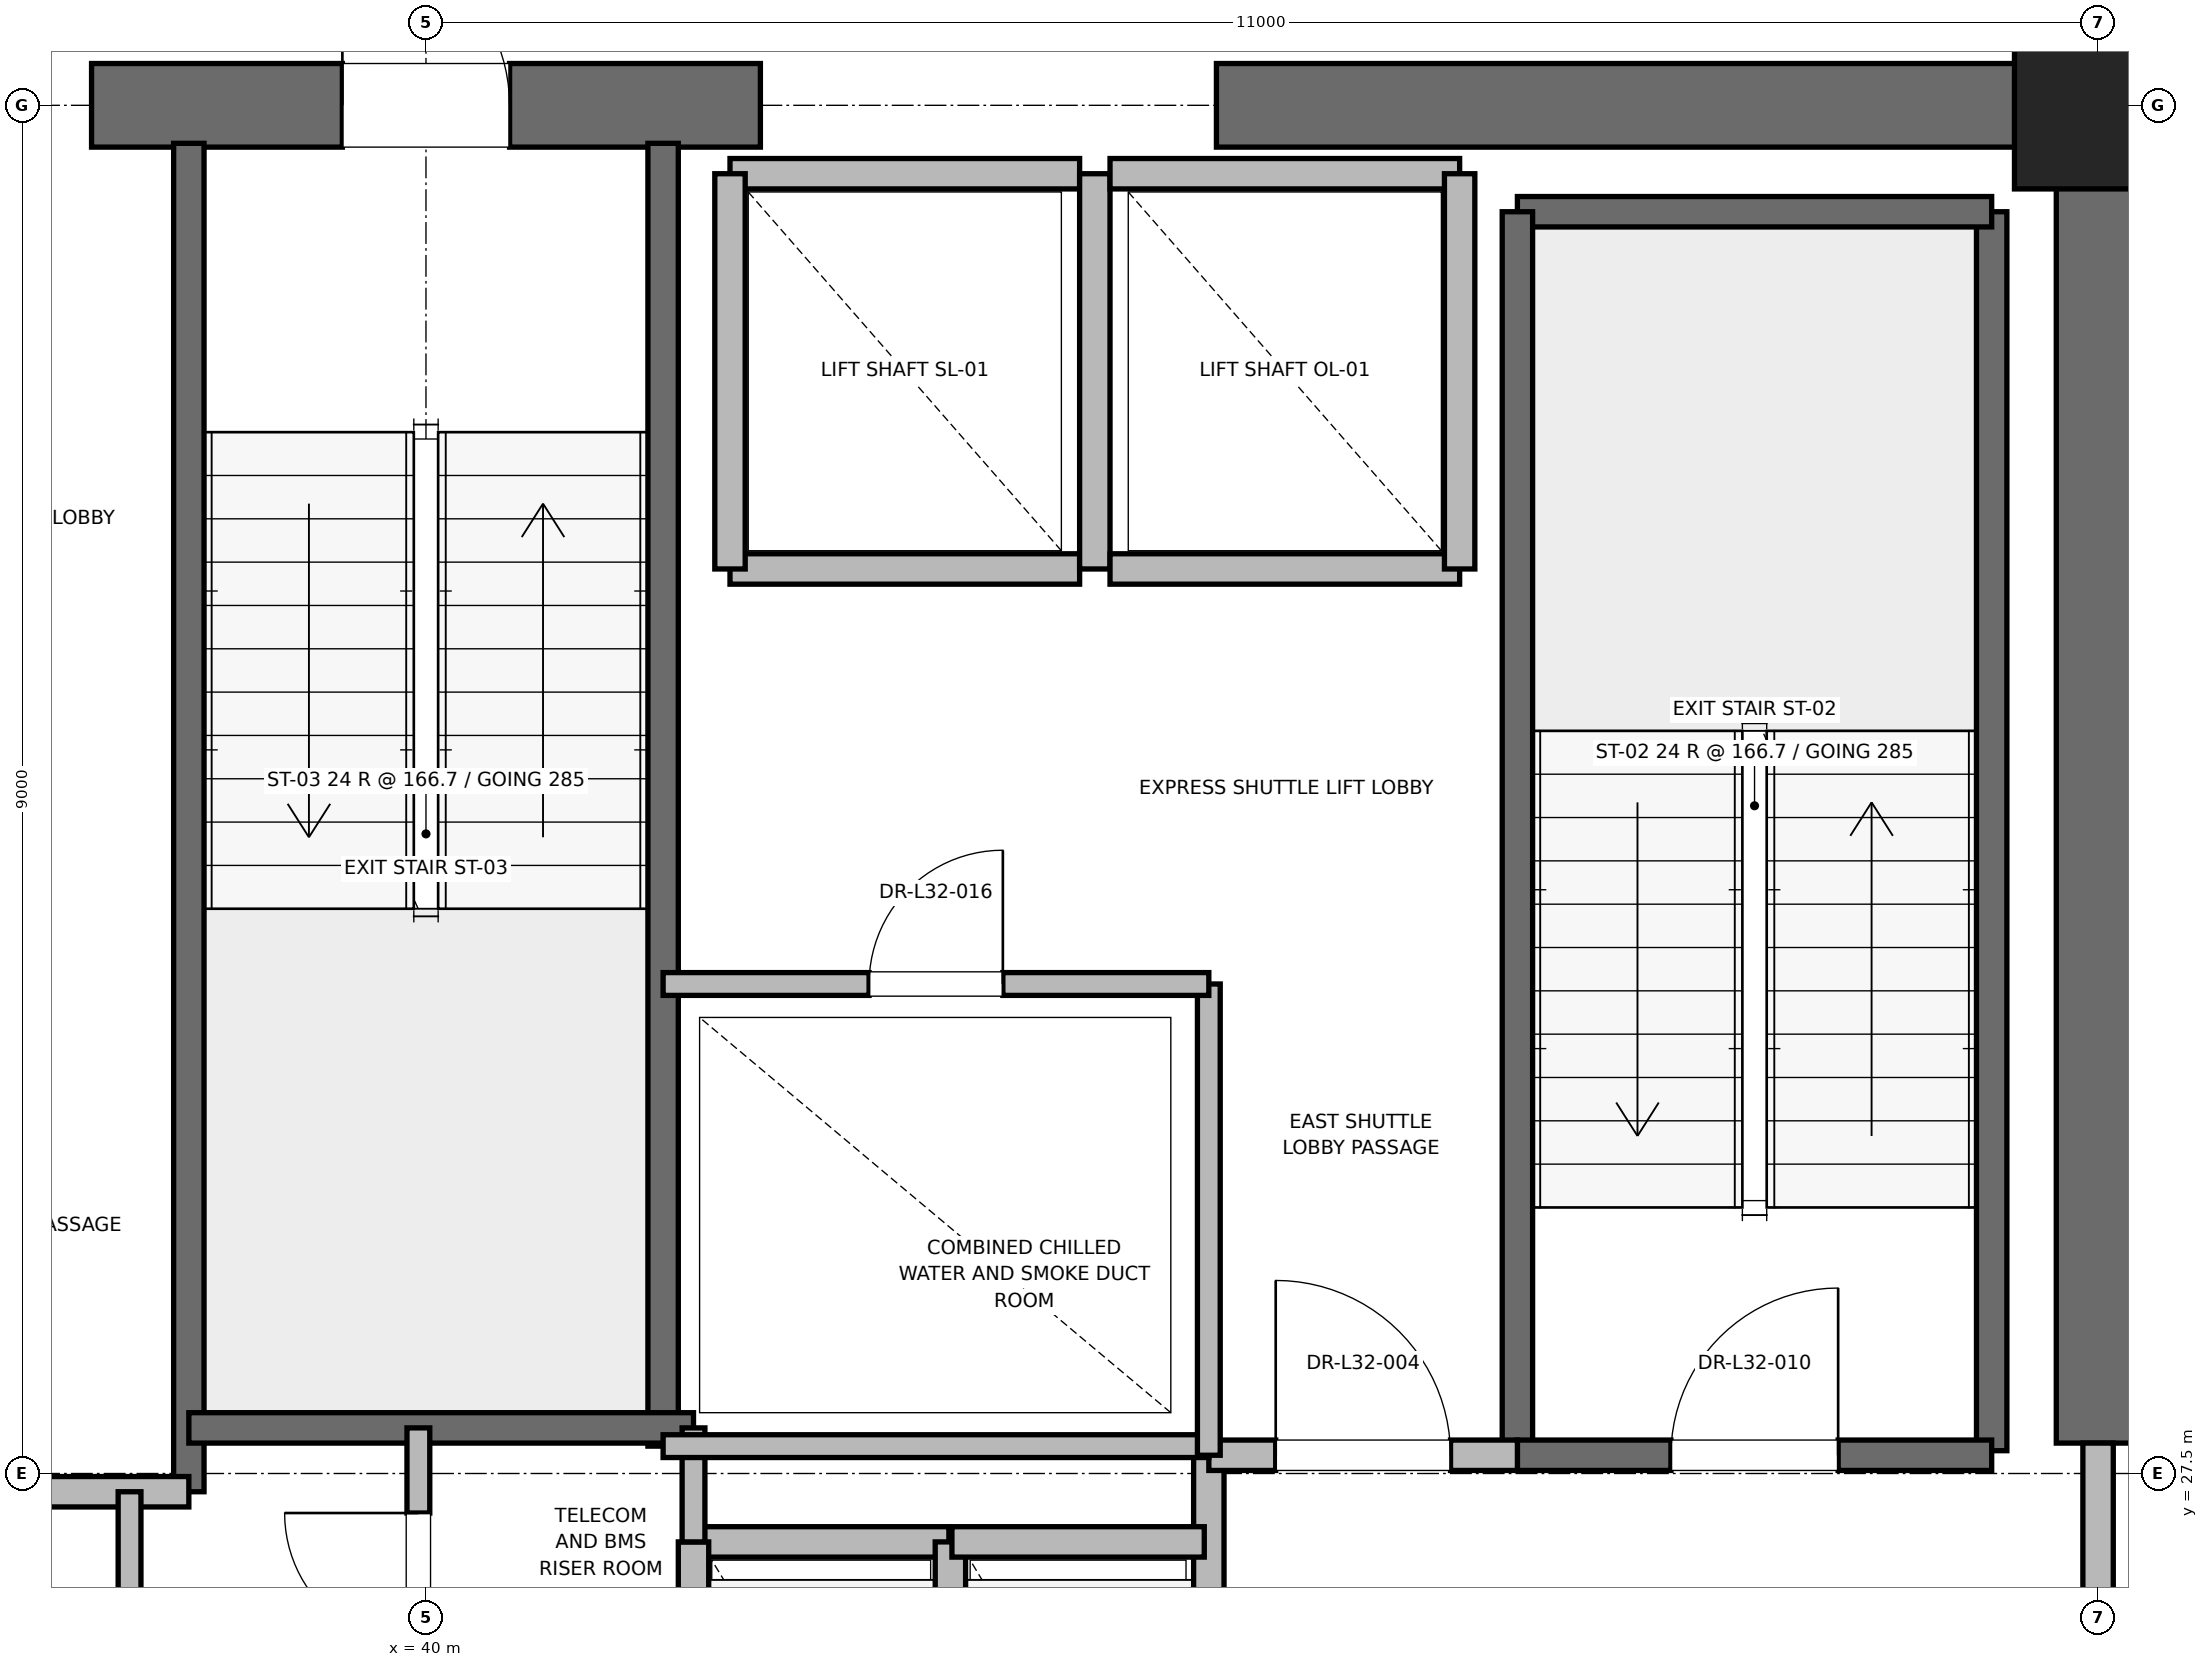
"""IFC4 building model, lengths in metres.
Left out: names, types, materials, properties, quantities, classifications, styles, units other than length and angle.
Written with IfcOpenShell. Run it as: python <this file> out.ifc"""

import sys

from ifc_helpers import new_model, si_unit, direction, frame, frame_2d, origin, origin_2d, place, context, subcontext, project, spatial, rectangle, extrude, element, fill, save


model = new_model("IFC4")
c1 = context("Model", 3, precision=1e-05, world=origin(), true_north=direction((0.0, 1.0)))
c2 = subcontext(c1, "Body", "Model", "MODEL_VIEW")
j1 = project(units=[si_unit("LENGTHUNIT", "METRE"), si_unit("PLANEANGLEUNIT", "RADIAN")], contexts=[c1])
p1 = place(None, origin())
s1 = spatial("IfcSite", under=j1, at=p1, CompositionType="ELEMENT")
p2 = place(p1, origin())
s2 = spatial("IfcBuilding", under=s1, at=p2, CompositionType="ELEMENT")
p3 = place(p2, frame((0.0, 0.0, 140.4)))
s3 = spatial("IfcBuildingStorey", under=s2, at=p3, CompositionType="ELEMENT", Elevation=140.4)
p4 = place(p3, frame((51.0, 36.5, 0.0), z_axis=(0.0, 0.0, 1.0), x_axis=(1.0, 0.0, 0.0)))
e1 = element("IfcColumn", 1, at=p4, inside=s3, PredefinedType="PILASTER", context=c2, shape_type="SweptSolid", body=[
    extrude(rectangle(XDim=1.1, YDim=1.1, at=origin_2d()), origin(), (0.0, 0.0, 1.0), 4.0),
])
p5 = place(p3, frame((37.8, 36.5, 0.0), z_axis=(0.0, 0.0, 1.0), x_axis=(1.0, 0.0, 0.0)))
e2 = element("IfcWall", 2, at=p5, inside=s3, PredefinedType="SHEAR", context=c2, shape_type="SweptSolid", body=[
    extrude(rectangle(XDim=4.4, YDim=0.55, at=frame_2d((2.2, 0.0))), origin(), (0.0, 0.0, 1.0), 3.775),
])
p6 = place(p5, frame((1.65, 0.0, 0.0)))
e3 = element("IfcOpeningElement", 3, at=p6, cuts=e2, PredefinedType="OPENING", context=c2, shape_type="SweptSolid", body=[
    extrude(rectangle(XDim=1.1, YDim=2.15, at=frame_2d((0.55, 1.075))), frame((0.0, 0.275, 0.0), z_axis=(0.0, -1.0, 0.0), x_axis=(1.0, 0.0, 0.0)), (0.0, 0.0, 1.0), 0.55),
])
p7 = place(p3, frame((45.2, 36.5, 0.0), z_axis=(0.0, 0.0, 1.0), x_axis=(1.0, 0.0, 0.0)))
e4 = element("IfcWall", 4, at=p7, inside=s3, PredefinedType="SHEAR", context=c2, shape_type="SweptSolid", body=[
    extrude(rectangle(XDim=5.8, YDim=0.55, at=frame_2d((2.9, 0.0))), origin(), (0.0, 0.0, 1.0), 3.775),
])
p8 = place(p3, frame((51.0, 27.7, 0.0), z_axis=(0.0, 0.0, 1.0), x_axis=(0.0, 1.0, 0.0)))
e5 = element("IfcWall", 5, at=p8, inside=s3, PredefinedType="SHEAR", context=c2, shape_type="SweptSolid", body=[
    extrude(rectangle(XDim=8.8, YDim=0.55, at=frame_2d((4.4, 0.0))), origin(), (0.0, 0.0, 1.0), 3.775),
])
p9 = place(p3, frame((50.3, 27.65, 0.0), z_axis=(0.0, 0.0, 1.0), x_axis=(0.0, 1.0, 0.0)))
e6 = element("IfcWall", 6, at=p9, inside=s3, PredefinedType="SOLIDWALL", context=c2, shape_type="SweptSolid", body=[
    extrude(rectangle(XDim=8.15, YDim=0.2, at=frame_2d((4.075, 0.0))), origin(), (0.0, 0.0, 1.0), 3.775),
])
p10 = place(p3, frame((47.18, 35.8, 0.0), z_axis=(0.0, 0.0, 1.0), x_axis=(1.0, 0.0, 0.0)))
e7 = element("IfcWall", 7, at=p10, inside=s3, PredefinedType="SOLIDWALL", context=c2, shape_type="SweptSolid", body=[
    extrude(rectangle(XDim=3.12, YDim=0.2, at=frame_2d((1.56, 0.0))), origin(), (0.0, 0.0, 1.0), 3.775),
])
p11 = place(p3, frame((47.18, 27.62, 0.0), z_axis=(0.0, 0.0, 1.0), x_axis=(0.0, 1.0, 0.0)))
e8 = element("IfcWall", 8, at=p11, inside=s3, PredefinedType="SOLIDWALL", context=c2, shape_type="SweptSolid", body=[
    extrude(rectangle(XDim=8.18, YDim=0.2, at=frame_2d((4.09, 0.0))), origin(), (0.0, 0.0, 1.0), 3.775),
])
p12 = place(p3, frame((47.18, 27.62, 0.0), z_axis=(0.0, 0.0, 1.0), x_axis=(1.0, 0.0, 0.0)))
e9 = element("IfcWall", 9, at=p12, inside=s3, PredefinedType="SOLIDWALL", context=c2, shape_type="SweptSolid", body=[
    extrude(rectangle(XDim=3.12, YDim=0.2, at=frame_2d((1.56, 0.0))), origin(), (0.0, 0.0, 1.0), 3.775),
])
p13 = place(p12, frame((1.01, 0.0, 0.0)))
e10 = element("IfcOpeningElement", 10, at=p13, cuts=e9, PredefinedType="OPENING", context=c2, shape_type="SweptSolid", body=[
    extrude(rectangle(XDim=1.1, YDim=2.15, at=frame_2d((0.55, 1.075))), frame((0.0, 0.1, 0.0), z_axis=(0.0, -1.0, 0.0), x_axis=(1.0, 0.0, 0.0)), (0.0, 0.0, 1.0), 0.2),
])
p14 = place(p3, frame((38.44, 27.38, 0.0), z_axis=(0.0, 0.0, 1.0), x_axis=(0.0, 1.0, 0.0)))
e11 = element("IfcWall", 11, at=p14, inside=s3, PredefinedType="SOLIDWALL", context=c2, shape_type="SweptSolid", body=[
    extrude(rectangle(XDim=8.87, YDim=0.2, at=frame_2d((4.435, 0.0))), origin(), (0.0, 0.0, 1.0), 3.775),
])
p15 = place(p3, frame((41.56, 27.68, 0.0), z_axis=(0.0, 0.0, 1.0), x_axis=(0.0, 1.0, 0.0)))
e12 = element("IfcWall", 12, at=p15, inside=s3, PredefinedType="SOLIDWALL", context=c2, shape_type="SweptSolid", body=[
    extrude(rectangle(XDim=8.57, YDim=0.2, at=frame_2d((4.285, 0.0))), origin(), (0.0, 0.0, 1.0), 3.775),
])
p16 = place(p3, frame((38.44, 27.8, 0.0), z_axis=(0.0, 0.0, 1.0), x_axis=(1.0, 0.0, 0.0)))
e13 = element("IfcWall", 13, at=p16, inside=s3, PredefinedType="SOLIDWALL", context=c2, shape_type="SweptSolid", body=[
    extrude(rectangle(XDim=3.32, YDim=0.2, at=frame_2d((1.66, 0.0))), origin(), (0.0, 0.0, 1.0), 3.775),
])
p17 = place(p3, frame((32.82, 27.38, 0.0), z_axis=(0.0, 0.0, 1.0), x_axis=(1.0, 0.0, 0.0)))
e14 = element("IfcWall", 14, at=p17, inside=s3, PredefinedType="PARTITIONING", context=c2, shape_type="SweptSolid", body=[
    extrude(rectangle(XDim=5.62, YDim=0.2, at=frame_2d((2.81, 0.0))), origin(), (0.0, 0.0, 1.0), 3.775),
])
p18 = place(p3, frame((45.15, 24.25, 0.0), z_axis=(0.0, 0.0, 1.0), x_axis=(0.0, 1.0, 0.0)))
e15 = element("IfcWall", 15, at=p18, inside=s3, PredefinedType="PARTITIONING", context=c2, shape_type="SweptSolid", body=[
    extrude(rectangle(XDim=3.37, YDim=0.2, at=frame_2d((1.685, 0.0))), origin(), (0.0, 0.0, 1.0), 3.775),
])
p19 = place(p3, frame((45.15, 27.62, 0.0), z_axis=(0.0, 0.0, 1.0), x_axis=(1.0, 0.0, 0.0)))
e16 = element("IfcWall", 16, at=p19, inside=s3, PredefinedType="PARTITIONING", context=c2, shape_type="SweptSolid", body=[
    extrude(rectangle(XDim=2.03, YDim=0.2, at=frame_2d((1.015, 0.0))), origin(), (0.0, 0.0, 1.0), 3.775),
])
p20 = place(p19, frame((0.44, 0.0, 0.0)))
e17 = element("IfcOpeningElement", 17, at=p20, cuts=e16, PredefinedType="OPENING", context=c2, shape_type="SweptSolid", body=[
    extrude(rectangle(XDim=1.15, YDim=2.2, at=frame_2d((0.575, 1.1))), frame((0.0, 0.1, 0.0), z_axis=(0.0, -1.0, 0.0), x_axis=(1.0, 0.0, 0.0)), (0.0, 0.0, 1.0), 0.2),
])
p21 = place(p3, frame((51.0, 24.3, 0.0), z_axis=(0.0, 0.0, 1.0), x_axis=(0.0, 1.0, 0.0)))
e18 = element("IfcWall", 18, at=p21, inside=s3, PredefinedType="PARTITIONING", context=c2, shape_type="SweptSolid", body=[
    extrude(rectangle(XDim=3.4, YDim=0.2, at=frame_2d((1.7, 0.0))), origin(), (0.0, 0.0, 1.0), 2.755),
])
p22 = place(p21, frame((1.125, 0.0, 0.0)))
e19 = element("IfcOpeningElement", 19, at=p22, cuts=e18, PredefinedType="OPENING", context=c2, shape_type="SweptSolid", body=[
    extrude(rectangle(XDim=1.15, YDim=2.2, at=frame_2d((0.575, 1.1))), frame((0.0, 0.1, 0.0), z_axis=(0.0, -1.0, 0.0), x_axis=(1.0, 0.0, 0.0)), (0.0, 0.0, 1.0), 0.2),
])
p23 = place(p3, frame((43.44, 27.05, 0.0), z_axis=(0.0, 0.0, 1.0), x_axis=(-1.0, 0.0, 0.0)))
e20 = element("IfcWall", 20, at=p23, inside=s3, PredefinedType="SOLIDWALL", context=c2, shape_type="SweptSolid", body=[
    extrude(rectangle(XDim=1.68, YDim=0.2, at=frame_2d((0.84, 0.0))), origin(), (0.0, 0.0, 1.0), 3.775),
])
for number, where, z_axis, x_axis in (
    (21, (41.76, 27.05, 0.0), (0.0, 0.0, 1.0), (0.0, -1.0, 0.0)),
    (22, (43.45, 24.45, 0.0), (0.0, 0.0, 1.0), (0.0, 1.0, 0.0)),
):
    element("IfcWall", number, at=place(p3, frame(where, z_axis=z_axis, x_axis=x_axis)), inside=s3, PredefinedType="SOLIDWALL", context=c2, shape_type="SweptSolid", body=[
        extrude(rectangle(XDim=2.6, YDim=0.2, at=frame_2d((1.3, 0.0))), origin(), (0.0, 0.0, 1.0), 3.775),
    ])
p24 = place(p3, frame((45.12, 27.05, 0.0), z_axis=(0.0, 0.0, 1.0), x_axis=(-1.0, 0.0, 0.0)))
e23 = element("IfcWall", 23, at=p24, inside=s3, PredefinedType="SOLIDWALL", context=c2, shape_type="SweptSolid", body=[
    extrude(rectangle(XDim=1.66, YDim=0.2, at=frame_2d((0.83, 0.0))), origin(), (0.0, 0.0, 1.0), 3.775),
])
p25 = place(p3, frame((42.0, 33.45, 0.0), z_axis=(0.0, 0.0, 1.0), x_axis=(1.0, 0.0, 0.0)))
e24 = element("IfcWall", 24, at=p25, inside=s3, PredefinedType="SOLIDWALL", context=c2, shape_type="SweptSolid", body=[
    extrude(rectangle(XDim=2.3, YDim=0.2, at=frame_2d((1.15, 0.0))), origin(), (0.0, 0.0, 1.0), 3.775),
])
p26 = place(p3, frame((44.3, 36.05, 0.0), z_axis=(0.0, 0.0, 1.0), x_axis=(-1.0, 0.0, 0.0)))
e25 = element("IfcWall", 25, at=p26, inside=s3, PredefinedType="SOLIDWALL", context=c2, shape_type="SweptSolid", body=[
    extrude(rectangle(XDim=2.3, YDim=0.2, at=frame_2d((1.15, 0.0))), origin(), (0.0, 0.0, 1.0), 2.755),
])
for number, where, z_axis, x_axis in (
    (26, (42.0, 36.05, 0.0), (0.0, 0.0, 1.0), (0.0, -1.0, 0.0)),
    (27, (44.4, 33.45, 0.0), (0.0, 0.0, 1.0), (0.0, 1.0, 0.0)),
):
    element("IfcWall", number, at=place(p3, frame(where, z_axis=z_axis, x_axis=x_axis)), inside=s3, PredefinedType="SOLIDWALL", context=c2, shape_type="SweptSolid", body=[
        extrude(rectangle(XDim=2.6, YDim=0.2, at=frame_2d((1.3, 0.0))), origin(), (0.0, 0.0, 1.0), 2.755),
    ])
p27 = place(p3, frame((44.5, 33.45, 0.0), z_axis=(0.0, 0.0, 1.0), x_axis=(1.0, 0.0, 0.0)))
e28 = element("IfcWall", 28, at=p27, inside=s3, PredefinedType="SOLIDWALL", context=c2, shape_type="SweptSolid", body=[
    extrude(rectangle(XDim=2.3, YDim=0.2, at=frame_2d((1.15, 0.0))), origin(), (0.0, 0.0, 1.0), 3.775),
])
p28 = place(p3, frame((46.8, 36.05, 0.0), z_axis=(0.0, 0.0, 1.0), x_axis=(-1.0, 0.0, 0.0)))
e29 = element("IfcWall", 29, at=p28, inside=s3, PredefinedType="SOLIDWALL", context=c2, shape_type="SweptSolid", body=[
    extrude(rectangle(XDim=2.3, YDim=0.2, at=frame_2d((1.15, 0.0))), origin(), (0.0, 0.0, 1.0), 2.755),
])
p29 = place(p3, frame((46.8, 33.45, 0.0), z_axis=(0.0, 0.0, 1.0), x_axis=(0.0, 1.0, 0.0)))
e30 = element("IfcWall", 30, at=p29, inside=s3, PredefinedType="SOLIDWALL", context=c2, shape_type="SweptSolid", body=[
    extrude(rectangle(XDim=2.6, YDim=0.2, at=frame_2d((1.3, 0.0))), origin(), (0.0, 0.0, 1.0), 3.775),
])
p30 = place(p3, frame((41.76, 27.05, 0.0), z_axis=(0.0, 0.0, 1.0), x_axis=(0.0, 1.0, 0.0)))
e31 = element("IfcWall", 31, at=p30, inside=s3, PredefinedType="PARTITIONING", context=c2, shape_type="SweptSolid", body=[
    extrude(rectangle(XDim=0.75, YDim=0.15, at=frame_2d((0.375, 0.0))), origin(), (0.0, 0.0, 1.0), 2.85),
])
p31 = place(p3, frame((39.95, 25.8, 0.0), z_axis=(0.0, 0.0, 1.0), x_axis=(0.0, 1.0, 0.0)))
e32 = element("IfcWall", 32, at=p31, inside=s3, PredefinedType="PARTITIONING", context=c2, shape_type="SweptSolid", body=[
    extrude(rectangle(XDim=2.0, YDim=0.15, at=frame_2d((1.0, 0.0))), origin(), (0.0, 0.0, 1.0), 2.85),
])
p32 = place(p31, frame((0.56, 0.0, 0.0)))
e33 = element("IfcOpeningElement", 33, at=p32, cuts=e32, PredefinedType="OPENING", context=c2, shape_type="SweptSolid", body=[
    extrude(rectangle(XDim=0.88, YDim=2.1, at=frame_2d((0.44, 1.05))), frame((0.0, 0.075, 0.0), z_axis=(0.0, -1.0, 0.0), x_axis=(1.0, 0.0, 0.0)), (0.0, 0.0, 1.0), 0.15),
])
p33 = place(p3, frame((38.05, 18.6, 0.0), z_axis=(0.0, 0.0, 1.0), x_axis=(0.0, 1.0, 0.0)))
e34 = element("IfcWall", 34, at=p33, inside=s3, PredefinedType="PARTITIONING", context=c2, shape_type="SweptSolid", body=[
    extrude(rectangle(XDim=8.78, YDim=0.15, at=frame_2d((4.39, 0.0))), origin(), (0.0, 0.0, 1.0), 2.755),
])
p34 = place(p33, frame((3.89, 0.0, 0.0)))
e35 = element("IfcOpeningElement", 35, at=p34, cuts=e34, PredefinedType="OPENING", context=c2, shape_type="SweptSolid", body=[
    extrude(rectangle(XDim=1.0, YDim=2.15, at=frame_2d((0.5, 1.075))), frame((0.0, 0.075, 0.0), z_axis=(0.0, -1.0, 0.0), x_axis=(1.0, 0.0, 0.0)), (0.0, 0.0, 1.0), 0.15),
])
p35 = place(p3, frame((41.56, 27.68, 0.0), z_axis=(0.0, 0.0, 1.0), x_axis=(1.0, 0.0, 0.0)))
e36 = element("IfcWall", 36, at=p35, inside=s3, PredefinedType="PARTITIONING", context=c2, shape_type="SweptSolid", body=[
    extrude(rectangle(XDim=3.59, YDim=0.15, at=frame_2d((1.795, 0.0))), origin(), (0.0, 0.0, 1.0), 2.85),
])
p36 = place(p3, frame((45.15, 27.62, 0.0), z_axis=(0.0, 0.0, 1.0), x_axis=(0.0, 1.0, 0.0)))
e37 = element("IfcWall", 37, at=p36, inside=s3, PredefinedType="PARTITIONING", context=c2, shape_type="SweptSolid", body=[
    extrude(rectangle(XDim=3.1, YDim=0.15, at=frame_2d((1.55, 0.0))), origin(), (0.0, 0.0, 1.0), 2.85),
])
p37 = place(p3, frame((41.56, 30.72, 0.0), z_axis=(0.0, 0.0, 1.0), x_axis=(1.0, 0.0, 0.0)))
e38 = element("IfcWall", 38, at=p37, inside=s3, PredefinedType="PARTITIONING", context=c2, shape_type="SweptSolid", body=[
    extrude(rectangle(XDim=3.59, YDim=0.15, at=frame_2d((1.795, 0.0))), origin(), (0.0, 0.0, 1.0), 2.85),
])
p38 = place(p37, frame((1.355, 0.0, 0.0)))
e39 = element("IfcOpeningElement", 39, at=p38, cuts=e38, PredefinedType="OPENING", context=c2, shape_type="SweptSolid", body=[
    extrude(rectangle(XDim=0.88, YDim=2.1, at=frame_2d((0.44, 1.05))), frame((0.0, 0.075, 0.0), z_axis=(0.0, -1.0, 0.0), x_axis=(1.0, 0.0, 0.0)), (0.0, 0.0, 1.0), 0.15),
])
p39 = place(p13, origin())
e40 = element("IfcDoor", 40, at=p39, inside=s3, OperationType="SINGLE_SWING_RIGHT", PredefinedType="DOOR", context=c2, shape_type="SweptSolid", body=[
    extrude(rectangle(XDim=1.1, YDim=2.15, at=frame_2d((0.55, 1.075))), frame((0.0, 0.025, 0.0), z_axis=(0.0, -1.0, 0.0), x_axis=(1.0, 0.0, 0.0)), (0.0, 0.0, 1.0), 0.05),
])
fill(e10, e40)
p40 = place(p6, origin())
e41 = element("IfcDoor", 41, at=p40, inside=s3, OperationType="SINGLE_SWING_LEFT", PredefinedType="DOOR", context=c2, shape_type="SweptSolid", body=[
    extrude(rectangle(XDim=1.1, YDim=2.15, at=frame_2d((0.55, 1.075))), frame((0.0, 0.025, 0.0), z_axis=(0.0, -1.0, 0.0), x_axis=(1.0, 0.0, 0.0)), (0.0, 0.0, 1.0), 0.05),
])
fill(e3, e41)
p41 = place(p20, origin())
e42 = element("IfcDoor", 42, at=p41, inside=s3, OperationType="SINGLE_SWING_LEFT", PredefinedType="DOOR", context=c2, shape_type="SweptSolid", body=[
    extrude(rectangle(XDim=1.15, YDim=2.2, at=frame_2d((0.575, 1.1))), frame((0.0, 0.025, 0.0), z_axis=(0.0, -1.0, 0.0), x_axis=(1.0, 0.0, 0.0)), (0.0, 0.0, 1.0), 0.05),
])
fill(e17, e42)
p42 = place(p32, origin())
e43 = element("IfcDoor", 43, at=p42, inside=s3, OperationType="SINGLE_SWING_RIGHT", PredefinedType="DOOR", context=c2, shape_type="SweptSolid", body=[
    extrude(rectangle(XDim=0.88, YDim=2.1, at=frame_2d((0.44, 1.05))), frame((0.0, 0.025, 0.0), z_axis=(0.0, -1.0, 0.0), x_axis=(1.0, 0.0, 0.0)), (0.0, 0.0, 1.0), 0.05),
])
fill(e33, e43)
p43 = place(p38, origin())
e44 = element("IfcDoor", 44, at=p43, inside=s3, OperationType="SINGLE_SWING_RIGHT", PredefinedType="DOOR", context=c2, shape_type="SweptSolid", body=[
    extrude(rectangle(XDim=0.88, YDim=2.1, at=frame_2d((0.44, 1.05))), frame((0.0, 0.025, 0.0), z_axis=(0.0, -1.0, 0.0), x_axis=(1.0, 0.0, 0.0)), (0.0, 0.0, 1.0), 0.05),
])
fill(e39, e44)
save(model, sys.argv[1])
